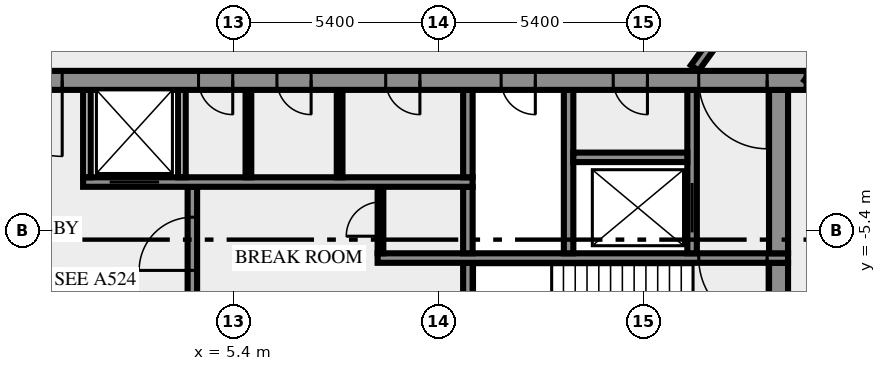
"""IFC4 building model, lengths in metres.
Left out: names, types, materials, properties, quantities, classifications, styles, units other than length and angle.
Written with IfcOpenShell. Run it as: python <this file> out.ifc"""

import sys

from ifc_helpers import new_model, si_unit, direction, frame, frame_2d, origin, place, context, subcontext, project, spatial, rectangle, extrude, element, fill, save


model = new_model("IFC4")
c1 = context("Model", 3, precision=1e-05, world=origin(), true_north=direction((0.0, 1.0)))
c2 = subcontext(c1, "Body", "Model", "MODEL_VIEW")
j1 = project(units=[si_unit("LENGTHUNIT", "METRE"), si_unit("PLANEANGLEUNIT", "RADIAN")], contexts=[c1])
p1 = place(None, origin())
s1 = spatial("IfcSite", under=j1, at=p1, CompositionType="ELEMENT")
p2 = place(p1, origin())
s2 = spatial("IfcBuilding", under=s1, at=p2, CompositionType="ELEMENT")
p3 = place(p2, frame((0.0, 0.0, 335.0)))
s3 = spatial("IfcBuildingStorey", under=s2, at=p3, CompositionType="ELEMENT", Elevation=335.0)
p4 = place(p3, frame((19.75, -10.5, 0.0), z_axis=(0.0, 0.0, 1.0), x_axis=(0.0, 1.0, 0.0)))
e1 = element("IfcWall", 1, at=p4, inside=s3, PredefinedType="SHEAR", context=c2, shape_type="SweptSolid", body=[
    extrude(rectangle(XDim=4.25, YDim=0.5, at=frame_2d((2.125, 0.0))), origin(), (0.0, 0.0, 1.0), 3.65),
])
p5 = place(p3, frame((4.325, -7.25, 0.0), z_axis=(0.0, 0.0, 1.0), x_axis=(0.0, 1.0, 0.0)))
e2 = element("IfcWall", 2, at=p5, inside=s3, PredefinedType="SHEAR", context=c2, shape_type="SweptSolid", body=[
    extrude(rectangle(XDim=3.0, YDim=0.25, at=frame_2d((1.5, 0.0))), origin(), (0.0, 0.0, 1.0), 3.65),
])
p6 = place(p5, frame((0.8, 0.0, 0.0)))
e3 = element("IfcOpeningElement", 3, at=p6, cuts=e2, PredefinedType="OPENING", context=c2, shape_type="SweptSolid", body=[
    extrude(rectangle(XDim=1.4, YDim=2.1, at=frame_2d((0.7, 1.05))), frame((0.0, 0.135, 0.0), z_axis=(0.0, -1.0, 0.0), x_axis=(1.0, 0.0, 0.0)), (0.0, 0.0, 1.0), 0.27),
])
p7 = place(p3, frame((11.575, -7.25, 0.0), z_axis=(0.0, 0.0, 1.0), x_axis=(0.0, 1.0, 0.0)))
e4 = element("IfcWall", 4, at=p7, inside=s3, PredefinedType="SHEAR", context=c2, shape_type="SweptSolid", body=[
    extrude(rectangle(XDim=1.0, YDim=0.25, at=frame_2d((0.5, 0.0))), origin(), (0.0, 0.0, 1.0), 3.65),
])
p8 = place(p3, frame((20.0, -6.125, 0.0), z_axis=(0.0, 0.0, 1.0), x_axis=(-1.0, 0.0, 0.0)))
e5 = element("IfcWall", 5, at=p8, inside=s3, PredefinedType="SHEAR", context=c2, shape_type="SweptSolid", body=[
    extrude(rectangle(XDim=10.8, YDim=0.25, at=frame_2d((5.4, 0.0))), origin(), (0.0, 0.0, 1.0), 3.65),
])
p9 = place(p8, frame((0.55, 0.0, 0.0)))
e6 = element("IfcOpeningElement", 6, at=p9, cuts=e5, PredefinedType="OPENING", context=c2, shape_type="SweptSolid", body=[
    extrude(rectangle(XDim=1.8, YDim=2.1, at=frame_2d((0.9, 1.05))), frame((0.0, 0.135, 0.0), z_axis=(0.0, -1.0, 0.0), x_axis=(1.0, 0.0, 0.0)), (0.0, 0.0, 1.0), 0.27),
])
p10 = place(p3, frame((9.275, -6.0, 0.0), z_axis=(0.0, 0.0, 1.0), x_axis=(0.0, 1.0, 0.0)))
e7 = element("IfcWall", 7, at=p10, inside=s3, PredefinedType="PARTITIONING", context=c2, shape_type="SweptSolid", body=[
    extrude(rectangle(XDim=1.75, YDim=0.15, at=frame_2d((0.875, 0.0))), origin(), (0.0, 0.0, 1.0), 3.65),
])
p11 = place(p10, frame((0.45, 0.0, 0.0)))
e8 = element("IfcOpeningElement", 8, at=p11, cuts=e7, PredefinedType="OPENING", context=c2, shape_type="SweptSolid", body=[
    extrude(rectangle(XDim=0.9, YDim=2.1, at=frame_2d((0.45, 1.05))), frame((0.0, 0.085, 0.0), z_axis=(0.0, -1.0, 0.0), x_axis=(1.0, 0.0, 0.0)), (0.0, 0.0, 1.0), 0.17),
])
p12 = place(p3, frame((11.575, -6.0, 0.0), z_axis=(0.0, 0.0, 1.0), x_axis=(0.0, 1.0, 0.0)))
e9 = element("IfcWall", 9, at=p12, inside=s3, PredefinedType="SHEAR", context=c2, shape_type="SweptSolid", body=[
    extrude(rectangle(XDim=1.75, YDim=0.25, at=frame_2d((0.875, 0.0))), origin(), (0.0, 0.0, 1.0), 3.65),
])
p13 = place(p3, frame((14.225, -6.0, 0.0), z_axis=(0.0, 0.0, 1.0), x_axis=(0.0, 1.0, 0.0)))
e10 = element("IfcWall", 10, at=p13, inside=s3, PredefinedType="SHEAR", context=c2, shape_type="SweptSolid", body=[
    extrude(rectangle(XDim=4.3, YDim=0.25, at=frame_2d((2.15, 0.0))), origin(), (0.0, 0.0, 1.0), 3.65),
])
p14 = place(p3, frame((17.475, -6.0, 0.0), z_axis=(0.0, 0.0, 1.0), x_axis=(0.0, 1.0, 0.0)))
e11 = element("IfcWall", 11, at=p14, inside=s3, PredefinedType="SHEAR", context=c2, shape_type="SweptSolid", body=[
    extrude(rectangle(XDim=4.3, YDim=0.25, at=frame_2d((2.15, 0.0))), origin(), (0.0, 0.0, 1.0), 3.65),
])
p15 = place(p14, frame((0.55, 0.0, 0.0)))
e12 = element("IfcOpeningElement", 12, at=p15, cuts=e11, PredefinedType="OPENING", context=c2, shape_type="SweptSolid", body=[
    extrude(rectangle(XDim=1.3, YDim=2.1, at=frame_2d((0.65, 1.05))), frame((0.0, 0.135, 0.0), z_axis=(0.0, -1.0, 0.0), x_axis=(1.0, 0.0, 0.0)), (0.0, 0.0, 1.0), 0.27),
])
p16 = place(p3, frame((19.75, -6.0, 0.0), z_axis=(0.0, 0.0, 1.0), x_axis=(0.0, 1.0, 0.0)))
e13 = element("IfcWall", 13, at=p16, inside=s3, PredefinedType="SHEAR", context=c2, shape_type="SweptSolid", body=[
    extrude(rectangle(XDim=4.3, YDim=0.5, at=frame_2d((2.15, 0.0))), origin(), (0.0, 0.0, 1.0), 3.65),
])
p17 = place(p3, frame((1.45, -4.125, 0.0), z_axis=(0.0, 0.0, 1.0), x_axis=(1.0, 0.0, 0.0)))
e14 = element("IfcWall", 14, at=p17, inside=s3, PredefinedType="SHEAR", context=c2, shape_type="SweptSolid", body=[
    extrude(rectangle(XDim=10.25, YDim=0.25, at=frame_2d((5.125, 0.0))), origin(), (0.0, 0.0, 1.0), 3.65),
])
p18 = place(p17, frame((0.7, 0.0, 0.0)))
e15 = element("IfcOpeningElement", 15, at=p18, cuts=e14, PredefinedType="OPENING", context=c2, shape_type="SweptSolid", body=[
    extrude(rectangle(XDim=1.3, YDim=2.1, at=frame_2d((0.65, 1.05))), frame((0.0, 0.135, 0.0), z_axis=(0.0, -1.0, 0.0), x_axis=(1.0, 0.0, 0.0)), (0.0, 0.0, 1.0), 0.27),
])
for number, where, z_axis, x_axis in (
    (16, (1.55, -4.0, 0.0), (0.0, 0.0, 1.0), (0.0, 1.0, 0.0)),
    (17, (4.05, -4.0, 0.0), (0.0, 0.0, 1.0), (0.0, 1.0, 0.0)),
):
    element("IfcWall", number, at=place(p3, frame(where, z_axis=z_axis, x_axis=x_axis)), inside=s3, PredefinedType="SOLIDWALL", context=c2, shape_type="SweptSolid", body=[
        extrude(rectangle(XDim=2.3, YDim=0.2, at=frame_2d((1.15, 0.0))), origin(), (0.0, 0.0, 1.0), 3.65),
    ])
for number, where, z_axis, x_axis in (
    (18, (5.8, -4.0, 0.0), (0.0, 0.0, 1.0), (0.0, 1.0, 0.0)),
    (19, (8.2, -4.0, 0.0), (0.0, 0.0, 1.0), (0.0, 1.0, 0.0)),
):
    element("IfcWall", number, at=place(p3, frame(where, z_axis=z_axis, x_axis=x_axis)), inside=s3, PredefinedType="PARTITIONING", context=c2, shape_type="SweptSolid", body=[
        extrude(rectangle(XDim=2.3, YDim=0.15, at=frame_2d((1.15, 0.0))), origin(), (0.0, 0.0, 1.0), 3.65),
    ])
p19 = place(p3, frame((11.575, -4.0, 0.0), z_axis=(0.0, 0.0, 1.0), x_axis=(0.0, 1.0, 0.0)))
e20 = element("IfcWall", 20, at=p19, inside=s3, PredefinedType="SHEAR", context=c2, shape_type="SweptSolid", body=[
    extrude(rectangle(XDim=2.3, YDim=0.25, at=frame_2d((1.15, 0.0))), origin(), (0.0, 0.0, 1.0), 3.65),
])
p20 = place(p3, frame((14.35, -3.475, 0.0), z_axis=(0.0, 0.0, 1.0), x_axis=(1.0, 0.0, 0.0)))
e21 = element("IfcWall", 21, at=p20, inside=s3, PredefinedType="SHEAR", context=c2, shape_type="SweptSolid", body=[
    extrude(rectangle(XDim=3.0, YDim=0.25, at=frame_2d((1.5, 0.0))), origin(), (0.0, 0.0, 1.0), 3.65),
])
p21 = place(p3, frame((20.49, -1.45, 0.0), z_axis=(0.0, 0.0, 1.0), x_axis=(-1.0, 0.0, 0.0)))
e22 = element("IfcWall", 22, at=p21, inside=s3, PredefinedType="SHEAR", context=c2, shape_type="SweptSolid", body=[
    extrude(rectangle(XDim=40.98, YDim=0.5, at=frame_2d((20.49, 0.0))), origin(), (0.0, 0.0, 1.0), 3.65),
])
p22 = place(p21, frame((38.14, 0.0, 0.0)))
e23 = element("IfcOpeningElement", 23, at=p22, cuts=e22, PredefinedType="OPENING", context=c2, shape_type="SweptSolid", body=[
    extrude(rectangle(XDim=1.8, YDim=2.1, at=frame_2d((0.9, 1.05))), frame((0.0, 0.26, 0.0), z_axis=(0.0, -1.0, 0.0), x_axis=(1.0, 0.0, 0.0)), (0.0, 0.0, 1.0), 0.52),
])
p23 = place(p21, frame((36.728, 0.0, 0.0)))
e24 = element("IfcOpeningElement", 24, at=p23, cuts=e22, PredefinedType="OPENING", context=c2, shape_type="SweptSolid", body=[
    extrude(rectangle(XDim=0.8, YDim=2.1, at=frame_2d((0.4, 1.05))), frame((0.0, 0.26, 0.0), z_axis=(0.0, -1.0, 0.0), x_axis=(1.0, 0.0, 0.0)), (0.0, 0.0, 1.0), 0.52),
])
p24 = place(p21, frame((35.153, 0.0, 0.0)))
e25 = element("IfcOpeningElement", 25, at=p24, cuts=e22, PredefinedType="OPENING", context=c2, shape_type="SweptSolid", body=[
    extrude(rectangle(XDim=0.8, YDim=2.1, at=frame_2d((0.4, 1.05))), frame((0.0, 0.26, 0.0), z_axis=(0.0, -1.0, 0.0), x_axis=(1.0, 0.0, 0.0)), (0.0, 0.0, 1.0), 0.52),
])
p25 = place(p21, frame((32.94, 0.0, 0.0)))
e26 = element("IfcOpeningElement", 26, at=p25, cuts=e22, PredefinedType="OPENING", context=c2, shape_type="SweptSolid", body=[
    extrude(rectangle(XDim=0.9, YDim=2.1, at=frame_2d((0.45, 1.05))), frame((0.0, 0.26, 0.0), z_axis=(0.0, -1.0, 0.0), x_axis=(1.0, 0.0, 0.0)), (0.0, 0.0, 1.0), 0.52),
])
p26 = place(p21, frame((31.015, 0.0, 0.0)))
e27 = element("IfcOpeningElement", 27, at=p26, cuts=e22, PredefinedType="OPENING", context=c2, shape_type="SweptSolid", body=[
    extrude(rectangle(XDim=0.8, YDim=2.1, at=frame_2d((0.4, 1.05))), frame((0.0, 0.26, 0.0), z_axis=(0.0, -1.0, 0.0), x_axis=(1.0, 0.0, 0.0)), (0.0, 0.0, 1.0), 0.52),
])
p27 = place(p21, frame((24.765, 0.0, 0.0)))
e28 = element("IfcOpeningElement", 28, at=p27, cuts=e22, PredefinedType="OPENING", context=c2, shape_type="SweptSolid", body=[
    extrude(rectangle(XDim=0.8, YDim=2.1, at=frame_2d((0.4, 1.05))), frame((0.0, 0.26, 0.0), z_axis=(0.0, -1.0, 0.0), x_axis=(1.0, 0.0, 0.0)), (0.0, 0.0, 1.0), 0.52),
])
p28 = place(p21, frame((19.59, 0.0, 0.0)))
e29 = element("IfcOpeningElement", 29, at=p28, cuts=e22, PredefinedType="OPENING", context=c2, shape_type="SweptSolid", body=[
    extrude(rectangle(XDim=2.0, YDim=2.1, at=frame_2d((1.0, 1.05))), frame((0.0, 0.26, 0.0), z_axis=(0.0, -1.0, 0.0), x_axis=(1.0, 0.0, 0.0)), (0.0, 0.0, 1.0), 0.52),
])
p29 = place(p21, frame((15.103, 0.0, 0.0)))
e30 = element("IfcOpeningElement", 30, at=p29, cuts=e22, PredefinedType="OPENING", context=c2, shape_type="SweptSolid", body=[
    extrude(rectangle(XDim=0.9, YDim=2.1, at=frame_2d((0.45, 1.05))), frame((0.0, 0.26, 0.0), z_axis=(0.0, -1.0, 0.0), x_axis=(1.0, 0.0, 0.0)), (0.0, 0.0, 1.0), 0.52),
])
p30 = place(p21, frame((13.04, 0.0, 0.0)))
e31 = element("IfcOpeningElement", 31, at=p30, cuts=e22, PredefinedType="OPENING", context=c2, shape_type="SweptSolid", body=[
    extrude(rectangle(XDim=0.9, YDim=2.1, at=frame_2d((0.45, 1.05))), frame((0.0, 0.26, 0.0), z_axis=(0.0, -1.0, 0.0), x_axis=(1.0, 0.0, 0.0)), (0.0, 0.0, 1.0), 0.52),
])
p31 = place(p21, frame((10.177, 0.0, 0.0)))
e32 = element("IfcOpeningElement", 32, at=p31, cuts=e22, PredefinedType="OPENING", context=c2, shape_type="SweptSolid", body=[
    extrude(rectangle(XDim=0.9, YDim=2.1, at=frame_2d((0.45, 1.05))), frame((0.0, 0.26, 0.0), z_axis=(0.0, -1.0, 0.0), x_axis=(1.0, 0.0, 0.0)), (0.0, 0.0, 1.0), 0.52),
])
p32 = place(p21, frame((7.14, 0.0, 0.0)))
e33 = element("IfcOpeningElement", 33, at=p32, cuts=e22, PredefinedType="OPENING", context=c2, shape_type="SweptSolid", body=[
    extrude(rectangle(XDim=0.9, YDim=2.1, at=frame_2d((0.45, 1.05))), frame((0.0, 0.26, 0.0), z_axis=(0.0, -1.0, 0.0), x_axis=(1.0, 0.0, 0.0)), (0.0, 0.0, 1.0), 0.52),
])
p33 = place(p21, frame((4.19, 0.0, 0.0)))
e34 = element("IfcOpeningElement", 34, at=p33, cuts=e22, PredefinedType="OPENING", context=c2, shape_type="SweptSolid", body=[
    extrude(rectangle(XDim=0.9, YDim=2.1, at=frame_2d((0.45, 1.05))), frame((0.0, 0.26, 0.0), z_axis=(0.0, -1.0, 0.0), x_axis=(1.0, 0.0, 0.0)), (0.0, 0.0, 1.0), 0.52),
])
p34 = place(p21, frame((1.04, 0.0, 0.0)))
e35 = element("IfcOpeningElement", 35, at=p34, cuts=e22, PredefinedType="OPENING", context=c2, shape_type="SweptSolid", body=[
    extrude(rectangle(XDim=1.8, YDim=2.1, at=frame_2d((0.9, 1.05))), frame((0.0, 0.26, 0.0), z_axis=(0.0, -1.0, 0.0), x_axis=(1.0, 0.0, 0.0)), (0.0, 0.0, 1.0), 0.52),
])
p35 = place(p3, frame((17.545, -1.125, 0.0), z_axis=(0.0, 0.0, 1.0), x_axis=(0.58779555165, 0.809009511354, 0.0)))
e36 = element("IfcWall", 36, at=p35, inside=s3, PredefinedType="SOLIDWALL", context=c2, shape_type="SweptSolid", body=[
    extrude(rectangle(XDim=18.103, YDim=0.25, at=frame_2d((9.052, 0.0))), origin(), (0.0, 0.0, 1.0), 3.65),
])
p36 = place(p35, frame((16.728, 0.0, 0.0)))
e37 = element("IfcOpeningElement", 37, at=p36, cuts=e36, PredefinedType="OPENING", context=c2, shape_type="SweptSolid", body=[
    extrude(rectangle(XDim=0.9, YDim=2.1, at=frame_2d((0.45, 1.05))), frame((0.0, 0.135, 0.0), z_axis=(0.0, -1.0, 0.0), x_axis=(1.0, 0.0, 0.0)), (0.0, 0.0, 1.0), 0.27),
])
p37 = place(p3, frame((30.183, 11.761, 0.0), z_axis=(0.0, 0.0, 1.0), x_axis=(-0.587781762867, -0.80901952958, 0.0)))
e38 = element("IfcWall", 38, at=p37, inside=s3, PredefinedType="SOLIDWALL", context=c2, shape_type="SweptSolid", body=[
    extrude(rectangle(XDim=16.42, YDim=0.25, at=frame_2d((8.21, 0.0))), origin(), (0.0, 0.0, 1.0), 3.65),
])
p38 = place(p37, frame((0.225, 0.0, 0.0)))
e39 = element("IfcOpeningElement", 39, at=p38, cuts=e38, PredefinedType="OPENING", context=c2, shape_type="SweptSolid", body=[
    extrude(rectangle(XDim=0.9, YDim=2.1, at=frame_2d((0.45, 1.05))), frame((0.0, 0.135, 0.0), z_axis=(0.0, -1.0, 0.0), x_axis=(1.0, 0.0, 0.0)), (0.0, 0.0, 1.0), 0.27),
])
p39 = place(p37, frame((9.304, 0.0, 0.0)))
e40 = element("IfcOpeningElement", 40, at=p39, cuts=e38, PredefinedType="OPENING", context=c2, shape_type="SweptSolid", body=[
    extrude(rectangle(XDim=0.9, YDim=2.1, at=frame_2d((0.45, 1.05))), frame((0.0, 0.135, 0.0), z_axis=(0.0, -1.0, 0.0), x_axis=(1.0, 0.0, 0.0)), (0.0, 0.0, 1.0), 0.27),
])
p40 = place(p6, origin())
e41 = element("IfcDoor", 41, at=p40, inside=s3, OperationType="DOUBLE_DOOR_SINGLE_SWING", PredefinedType="DOOR", context=c2, shape_type="SweptSolid", body=[
    extrude(rectangle(XDim=1.4, YDim=2.1, at=frame_2d((0.7, 1.05))), frame((0.0, 0.025, 0.0), z_axis=(0.0, -1.0, 0.0), x_axis=(1.0, 0.0, 0.0)), (0.0, 0.0, 1.0), 0.05),
])
fill(e3, e41)
p41 = place(p9, origin())
e42 = element("IfcDoor", 42, at=p41, inside=s3, OperationType="DOUBLE_DOOR_SINGLE_SWING", PredefinedType="DOOR", context=c2, shape_type="SweptSolid", body=[
    extrude(rectangle(XDim=1.8, YDim=2.1, at=frame_2d((0.9, 1.05))), frame((0.0, 0.025, 0.0), z_axis=(0.0, -1.0, 0.0), x_axis=(1.0, 0.0, 0.0)), (0.0, 0.0, 1.0), 0.05),
])
fill(e6, e42)
p42 = place(p11, origin())
e43 = element("IfcDoor", 43, at=p42, inside=s3, OperationType="SINGLE_SWING_RIGHT", PredefinedType="DOOR", context=c2, shape_type="SweptSolid", body=[
    extrude(rectangle(XDim=0.9, YDim=2.1, at=frame_2d((0.45, 1.05))), frame((0.0, 0.025, 0.0), z_axis=(0.0, -1.0, 0.0), x_axis=(1.0, 0.0, 0.0)), (0.0, 0.0, 1.0), 0.05),
])
fill(e8, e43)
p43 = place(p15, origin())
e44 = element("IfcDoor", 44, at=p43, inside=s3, OperationType="DOUBLE_DOOR_SLIDING", PredefinedType="DOOR", context=c2, shape_type="SweptSolid", body=[
    extrude(rectangle(XDim=1.3, YDim=2.1, at=frame_2d((0.65, 1.05))), frame((0.0, 0.025, 0.0), z_axis=(0.0, -1.0, 0.0), x_axis=(1.0, 0.0, 0.0)), (0.0, 0.0, 1.0), 0.05),
])
fill(e12, e44)
p44 = place(p18, origin())
e45 = element("IfcDoor", 45, at=p44, inside=s3, OperationType="DOUBLE_DOOR_SLIDING", PredefinedType="DOOR", context=c2, shape_type="SweptSolid", body=[
    extrude(rectangle(XDim=1.3, YDim=2.1, at=frame_2d((0.65, 1.05))), frame((0.0, 0.025, 0.0), z_axis=(0.0, -1.0, 0.0), x_axis=(1.0, 0.0, 0.0)), (0.0, 0.0, 1.0), 0.05),
])
fill(e15, e45)
p45 = place(p28, origin())
e46 = element("IfcDoor", 46, at=p45, inside=s3, OperationType="DOUBLE_DOOR_SINGLE_SWING", PredefinedType="DOOR", context=c2, shape_type="SweptSolid", body=[
    extrude(rectangle(XDim=2.0, YDim=2.1, at=frame_2d((1.0, 1.05))), frame((0.0, 0.025, 0.0), z_axis=(0.0, -1.0, 0.0), x_axis=(1.0, 0.0, 0.0)), (0.0, 0.0, 1.0), 0.05),
])
fill(e29, e46)
p46 = place(p29, origin())
e47 = element("IfcDoor", 47, at=p46, inside=s3, OperationType="SINGLE_SWING_LEFT", PredefinedType="DOOR", context=c2, shape_type="SweptSolid", body=[
    extrude(rectangle(XDim=0.9, YDim=2.1, at=frame_2d((0.45, 1.05))), frame((0.0, 0.025, 0.0), z_axis=(0.0, -1.0, 0.0), x_axis=(1.0, 0.0, 0.0)), (0.0, 0.0, 1.0), 0.05),
])
fill(e30, e47)
p47 = place(p30, origin())
e48 = element("IfcDoor", 48, at=p47, inside=s3, OperationType="SINGLE_SWING_LEFT", PredefinedType="DOOR", context=c2, shape_type="SweptSolid", body=[
    extrude(rectangle(XDim=0.9, YDim=2.1, at=frame_2d((0.45, 1.05))), frame((0.0, 0.025, 0.0), z_axis=(0.0, -1.0, 0.0), x_axis=(1.0, 0.0, 0.0)), (0.0, 0.0, 1.0), 0.05),
])
fill(e31, e48)
p48 = place(p31, origin())
e49 = element("IfcDoor", 49, at=p48, inside=s3, OperationType="SINGLE_SWING_LEFT", PredefinedType="DOOR", context=c2, shape_type="SweptSolid", body=[
    extrude(rectangle(XDim=0.9, YDim=2.1, at=frame_2d((0.45, 1.05))), frame((0.0, 0.025, 0.0), z_axis=(0.0, -1.0, 0.0), x_axis=(1.0, 0.0, 0.0)), (0.0, 0.0, 1.0), 0.05),
])
fill(e32, e49)
p49 = place(p32, origin())
e50 = element("IfcDoor", 50, at=p49, inside=s3, OperationType="SINGLE_SWING_LEFT", PredefinedType="DOOR", context=c2, shape_type="SweptSolid", body=[
    extrude(rectangle(XDim=0.9, YDim=2.1, at=frame_2d((0.45, 1.05))), frame((0.0, 0.025, 0.0), z_axis=(0.0, -1.0, 0.0), x_axis=(1.0, 0.0, 0.0)), (0.0, 0.0, 1.0), 0.05),
])
fill(e33, e50)
p50 = place(p33, origin())
e51 = element("IfcDoor", 51, at=p50, inside=s3, OperationType="SINGLE_SWING_LEFT", PredefinedType="DOOR", context=c2, shape_type="SweptSolid", body=[
    extrude(rectangle(XDim=0.9, YDim=2.1, at=frame_2d((0.45, 1.05))), frame((0.0, 0.025, 0.0), z_axis=(0.0, -1.0, 0.0), x_axis=(1.0, 0.0, 0.0)), (0.0, 0.0, 1.0), 0.05),
])
fill(e34, e51)
p51 = place(p34, origin())
e52 = element("IfcDoor", 52, at=p51, inside=s3, OperationType="DOUBLE_DOOR_SINGLE_SWING", PredefinedType="DOOR", context=c2, shape_type="SweptSolid", body=[
    extrude(rectangle(XDim=1.8, YDim=2.1, at=frame_2d((0.9, 1.05))), frame((0.0, 0.025, 0.0), z_axis=(0.0, -1.0, 0.0), x_axis=(1.0, 0.0, 0.0)), (0.0, 0.0, 1.0), 0.05),
])
fill(e35, e52)
save(model, sys.argv[1])
